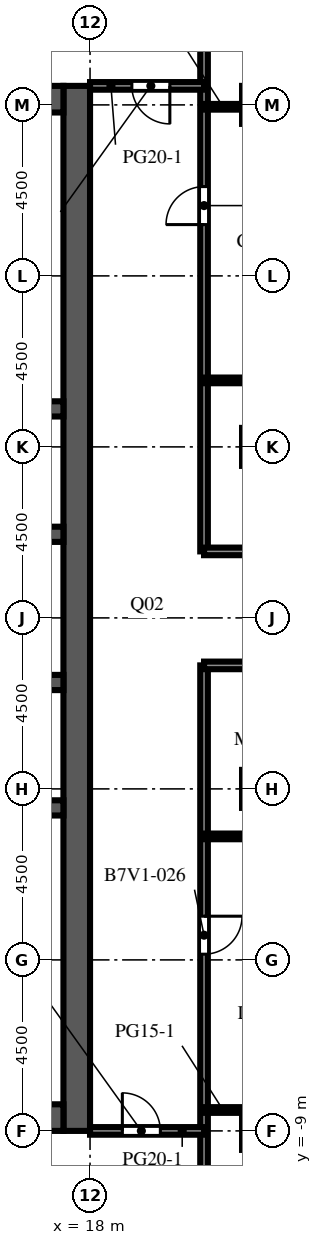
"""IFC4 building model, lengths in metres.
Left out: names, types, materials, properties, quantities, classifications, styles, units other than length and angle.
Written with IfcOpenShell. Run it as: python <this file> out.ifc"""

import sys

from ifc_helpers import new_model, si_unit, direction, frame, frame_2d, origin, place, context, subcontext, project, spatial, rectangle, extrude, element, fill, save


model = new_model("IFC4")
c1 = context("Model", 3, precision=1e-05, world=origin(), true_north=direction((0.0, 1.0)))
c2 = subcontext(c1, "Body", "Model", "MODEL_VIEW")
j1 = project(units=[si_unit("LENGTHUNIT", "METRE"), si_unit("PLANEANGLEUNIT", "RADIAN")], contexts=[c1])
p1 = place(None, origin())
s1 = spatial("IfcSite", under=j1, at=p1, CompositionType="ELEMENT")
p2 = place(p1, origin())
s2 = spatial("IfcBuilding", under=s1, at=p2, CompositionType="ELEMENT")
p3 = place(p2, frame((0.0, 0.0, 248.0)))
s3 = spatial("IfcBuildingStorey", under=s2, at=p3, CompositionType="ELEMENT", Elevation=248.0)
p4 = place(p3, frame((17.65, -9.0, 0.0), z_axis=(0.0, 0.0, 1.0), x_axis=(0.0, 1.0, 0.0)))
e1 = element("IfcWall", 1, at=p4, inside=s3, PredefinedType="SHEAR", context=c2, shape_type="SweptSolid", body=[
    extrude(rectangle(XDim=27.5, YDim=0.7, at=frame_2d((13.75, 0.0))), origin(), (0.0, 0.0, 1.0), 4.1),
])
p5 = place(p4, frame((12.55, 0.0, 0.0)))
e2 = element("IfcOpeningElement", 2, at=p5, cuts=e1, PredefinedType="OPENING", context=c2, shape_type="SweptSolid", body=[
    extrude(rectangle(XDim=2.4, YDim=2.4, at=frame_2d((1.2, 1.2))), frame((0.0, 0.36, 0.0), z_axis=(0.0, -1.0, 0.0), x_axis=(1.0, 0.0, 0.0)), (0.0, 0.0, 1.0), 0.72),
])
p6 = place(p4, frame((6.825, 0.0, 0.0)))
e3 = element("IfcOpeningElement", 3, at=p6, cuts=e1, PredefinedType="OPENING", context=c2, shape_type="SweptSolid", body=[
    extrude(rectangle(XDim=1.2, YDim=2.1, at=frame_2d((0.6, 1.05))), frame((0.0, 0.36, 0.0), z_axis=(0.0, -1.0, 0.0), x_axis=(1.0, 0.0, 0.0)), (0.0, 0.0, 1.0), 0.72),
])
p7 = place(p4, frame((19.475, 0.0, 0.0)))
e4 = element("IfcOpeningElement", 4, at=p7, cuts=e1, PredefinedType="OPENING", context=c2, shape_type="SweptSolid", body=[
    extrude(rectangle(XDim=1.2, YDim=2.1, at=frame_2d((0.6, 1.05))), frame((0.0, 0.36, 0.0), z_axis=(0.0, -1.0, 0.0), x_axis=(1.0, 0.0, 0.0)), (0.0, 0.0, 1.0), 0.72),
])
for number, where, z_axis, x_axis in (
    (5, (6.7, -8.65, 0.0), (0.0, 0.0, 1.0), (1.0, 0.0, 0.0)),
    (6, (6.7, 18.15, 0.0), (0.0, 0.0, 1.0), (1.0, 0.0, 0.0)),
):
    element("IfcWall", number, at=place(p3, frame(where, z_axis=z_axis, x_axis=x_axis)), inside=s3, PredefinedType="SHEAR", context=c2, shape_type="SweptSolid", body=[
        extrude(rectangle(XDim=10.6, YDim=0.7, at=frame_2d((5.3, 0.0))), origin(), (0.0, 0.0, 1.0), 4.1),
    ])
p8 = place(p3, frame((6.7, -0.5, 0.0), z_axis=(0.0, 0.0, 1.0), x_axis=(1.0, 0.0, 0.0)))
e7 = element("IfcWall", 7, at=p8, inside=s3, PredefinedType="SHEAR", context=c2, shape_type="SweptSolid", body=[
    extrude(rectangle(XDim=10.6, YDim=0.4, at=frame_2d((5.3, 0.0))), origin(), (0.0, 0.0, 1.0), 4.1),
])
p9 = place(p3, frame((6.7, 2.8, 0.0), z_axis=(0.0, 0.0, 1.0), x_axis=(1.0, 0.0, 0.0)))
e8 = element("IfcWall", 8, at=p9, inside=s3, PredefinedType="SHEAR", context=c2, shape_type="SweptSolid", body=[
    extrude(rectangle(XDim=10.6, YDim=0.4, at=frame_2d((5.3, 0.0))), origin(), (0.0, 0.0, 1.0), 4.1),
])
p10 = place(p9, frame((0.688, 0.0, 0.0)))
e9 = element("IfcOpeningElement", 9, at=p10, cuts=e8, PredefinedType="OPENING", context=c2, shape_type="SweptSolid", body=[
    extrude(rectangle(XDim=1.1, YDim=2.1, at=frame_2d((0.55, 1.05))), frame((0.0, 0.21, 0.0), z_axis=(0.0, -1.0, 0.0), x_axis=(1.0, 0.0, 0.0)), (0.0, 0.0, 1.0), 0.42),
])
p11 = place(p9, frame((3.438, 0.0, 0.0)))
e10 = element("IfcOpeningElement", 10, at=p11, cuts=e8, PredefinedType="OPENING", context=c2, shape_type="SweptSolid", body=[
    extrude(rectangle(XDim=1.1, YDim=2.1, at=frame_2d((0.55, 1.05))), frame((0.0, 0.21, 0.0), z_axis=(0.0, -1.0, 0.0), x_axis=(1.0, 0.0, 0.0)), (0.0, 0.0, 1.0), 0.42),
])
p12 = place(p9, frame((6.113, 0.0, 0.0)))
e11 = element("IfcOpeningElement", 11, at=p12, cuts=e8, PredefinedType="OPENING", context=c2, shape_type="SweptSolid", body=[
    extrude(rectangle(XDim=1.0, YDim=2.1, at=frame_2d((0.5, 1.05))), frame((0.0, 0.21, 0.0), z_axis=(0.0, -1.0, 0.0), x_axis=(1.0, 0.0, 0.0)), (0.0, 0.0, 1.0), 0.42),
])
p13 = place(p9, frame((8.863, 0.0, 0.0)))
e12 = element("IfcOpeningElement", 12, at=p13, cuts=e8, PredefinedType="OPENING", context=c2, shape_type="SweptSolid", body=[
    extrude(rectangle(XDim=1.0, YDim=2.1, at=frame_2d((0.5, 1.05))), frame((0.0, 0.21, 0.0), z_axis=(0.0, -1.0, 0.0), x_axis=(1.0, 0.0, 0.0)), (0.0, 0.0, 1.0), 0.42),
])
p14 = place(p3, frame((6.7, 6.7, 0.0), z_axis=(0.0, 0.0, 1.0), x_axis=(1.0, 0.0, 0.0)))
e13 = element("IfcWall", 13, at=p14, inside=s3, PredefinedType="SHEAR", context=c2, shape_type="SweptSolid", body=[
    extrude(rectangle(XDim=10.6, YDim=0.4, at=frame_2d((5.3, 0.0))), origin(), (0.0, 0.0, 1.0), 4.1),
])
p15 = place(p14, frame((3.438, 0.0, 0.0)))
e14 = element("IfcOpeningElement", 14, at=p15, cuts=e13, PredefinedType="OPENING", context=c2, shape_type="SweptSolid", body=[
    extrude(rectangle(XDim=1.1, YDim=2.1, at=frame_2d((0.55, 1.05))), frame((0.0, 0.21, 0.0), z_axis=(0.0, -1.0, 0.0), x_axis=(1.0, 0.0, 0.0)), (0.0, 0.0, 1.0), 0.42),
])
p16 = place(p14, frame((6.062, 0.0, 0.0)))
e15 = element("IfcOpeningElement", 15, at=p16, cuts=e13, PredefinedType="OPENING", context=c2, shape_type="SweptSolid", body=[
    extrude(rectangle(XDim=1.1, YDim=2.1, at=frame_2d((0.55, 1.05))), frame((0.0, 0.21, 0.0), z_axis=(0.0, -1.0, 0.0), x_axis=(1.0, 0.0, 0.0)), (0.0, 0.0, 1.0), 0.42),
])
p17 = place(p14, frame((8.812, 0.0, 0.0)))
e16 = element("IfcOpeningElement", 16, at=p17, cuts=e13, PredefinedType="OPENING", context=c2, shape_type="SweptSolid", body=[
    extrude(rectangle(XDim=1.1, YDim=2.1, at=frame_2d((0.55, 1.05))), frame((0.0, 0.21, 0.0), z_axis=(0.0, -1.0, 0.0), x_axis=(1.0, 0.0, 0.0)), (0.0, 0.0, 1.0), 0.42),
])
p18 = place(p14, frame((0.738, 0.0, 0.0)))
e17 = element("IfcOpeningElement", 17, at=p18, cuts=e13, PredefinedType="OPENING", context=c2, shape_type="SweptSolid", body=[
    extrude(rectangle(XDim=1.0, YDim=2.1, at=frame_2d((0.5, 1.05))), frame((0.0, 0.21, 0.0), z_axis=(0.0, -1.0, 0.0), x_axis=(1.0, 0.0, 0.0)), (0.0, 0.0, 1.0), 0.42),
])
p19 = place(p3, frame((6.7, 10.0, 0.0), z_axis=(0.0, 0.0, 1.0), x_axis=(1.0, 0.0, 0.0)))
e18 = element("IfcWall", 18, at=p19, inside=s3, PredefinedType="SHEAR", context=c2, shape_type="SweptSolid", body=[
    extrude(rectangle(XDim=10.6, YDim=0.4, at=frame_2d((5.3, 0.0))), origin(), (0.0, 0.0, 1.0), 4.1),
])
p20 = place(p3, frame((21.0, 3.25, 0.0), z_axis=(0.0, 0.0, 1.0), x_axis=(0.0, -1.0, 0.0)))
e19 = element("IfcWall", 19, at=p20, inside=s3, PredefinedType="PARTITIONING", context=c2, shape_type="SweptSolid", body=[
    extrude(rectangle(XDim=25.6, YDim=0.2, at=frame_2d((12.8, 0.0))), origin(), (0.0, 0.0, 1.0), 3.65),
])
p21 = place(p20, frame((6.6, 0.0, 0.0)))
e20 = element("IfcOpeningElement", 20, at=p21, cuts=e19, PredefinedType="OPENING", context=c2, shape_type="SweptSolid", body=[
    extrude(rectangle(XDim=1.0, YDim=2.1, at=frame_2d((0.5, 1.05))), frame((0.0, 0.11, 0.0), z_axis=(0.0, -1.0, 0.0), x_axis=(1.0, 0.0, 0.0)), (0.0, 0.0, 1.0), 0.22),
])
p22 = place(p3, frame((21.0, 31.35, 0.0), z_axis=(0.0, 0.0, 1.0), x_axis=(0.0, -1.0, 0.0)))
e21 = element("IfcWall", 21, at=p22, inside=s3, PredefinedType="PARTITIONING", context=c2, shape_type="SweptSolid", body=[
    extrude(rectangle(XDim=25.1, YDim=0.2, at=frame_2d((12.55, 0.0))), origin(), (0.0, 0.0, 1.0), 3.65),
])
p23 = place(p22, frame((15.5, 0.0, 0.0)))
e22 = element("IfcOpeningElement", 22, at=p23, cuts=e21, PredefinedType="OPENING", context=c2, shape_type="SweptSolid", body=[
    extrude(rectangle(XDim=1.0, YDim=2.1, at=frame_2d((0.5, 1.05))), frame((0.0, 0.11, 0.0), z_axis=(0.0, -1.0, 0.0), x_axis=(1.0, 0.0, 0.0)), (0.0, 0.0, 1.0), 0.22),
])
p24 = place(p3, frame((21.0, -9.0, 0.0), z_axis=(0.0, 0.0, 1.0), x_axis=(-1.0, 0.0, 0.0)))
e23 = element("IfcWall", 23, at=p24, inside=s3, PredefinedType="PARTITIONING", context=c2, shape_type="SweptSolid", body=[
    extrude(rectangle(XDim=3.0, YDim=0.2, at=frame_2d((1.5, 0.0))), origin(), (0.0, 0.0, 1.0), 3.65),
])
p25 = place(p24, frame((1.15, 0.0, 0.0)))
e24 = element("IfcOpeningElement", 24, at=p25, cuts=e23, PredefinedType="OPENING", context=c2, shape_type="SweptSolid", body=[
    extrude(rectangle(XDim=1.0, YDim=2.1, at=frame_2d((0.5, 1.05))), frame((0.0, 0.11, 0.0), z_axis=(0.0, -1.0, 0.0), x_axis=(1.0, 0.0, 0.0)), (0.0, 0.0, 1.0), 0.22),
])
p26 = place(p3, frame((21.0, -8.45, 0.0), z_axis=(0.0, 0.0, 1.0), x_axis=(1.0, 0.0, 0.0)))
e25 = element("IfcWall", 25, at=p26, inside=s3, PredefinedType="PARTITIONING", context=c2, shape_type="SweptSolid", body=[
    extrude(rectangle(XDim=1.0, YDim=0.15, at=frame_2d((0.5, 0.0))), origin(), (0.0, 0.0, 1.0), 3.65),
])
p27 = place(p3, frame((21.0, -1.25, 0.0), z_axis=(0.0, 0.0, 1.0), x_axis=(1.0, 0.0, 0.0)))
e26 = element("IfcWall", 26, at=p27, inside=s3, PredefinedType="PARTITIONING", context=c2, shape_type="SweptSolid", body=[
    extrude(rectangle(XDim=5.85, YDim=0.15, at=frame_2d((2.925, 0.0))), origin(), (0.0, 0.0, 1.0), 3.65),
])
p28 = place(p27, frame((3.1, 0.0, 0.0)))
e27 = element("IfcOpeningElement", 27, at=p28, cuts=e26, PredefinedType="OPENING", context=c2, shape_type="SweptSolid", body=[
    extrude(rectangle(XDim=1.0, YDim=2.1, at=frame_2d((0.5, 1.05))), frame((0.0, 0.085, 0.0), z_axis=(0.0, -1.0, 0.0), x_axis=(1.0, 0.0, 0.0)), (0.0, 0.0, 1.0), 0.17),
])
for number, where, z_axis, x_axis in (
    (28, (21.0, 3.25, 0.0), (0.0, 0.0, 1.0), (1.0, 0.0, 0.0)),
    (29, (21.0, 6.25, 0.0), (0.0, 0.0, 1.0), (1.0, 0.0, 0.0)),
):
    element("IfcWall", number, at=place(p3, frame(where, z_axis=z_axis, x_axis=x_axis)), inside=s3, PredefinedType="PARTITIONING", context=c2, shape_type="SweptSolid", body=[
        extrude(rectangle(XDim=5.85, YDim=0.2, at=frame_2d((2.925, 0.0))), origin(), (0.0, 0.0, 1.0), 3.65),
    ])
p29 = place(p3, frame((26.85, 10.75, 0.0), z_axis=(0.0, 0.0, 1.0), x_axis=(-1.0, 0.0, 0.0)))
e30 = element("IfcWall", 30, at=p29, inside=s3, PredefinedType="PARTITIONING", context=c2, shape_type="SweptSolid", body=[
    extrude(rectangle(XDim=5.85, YDim=0.15, at=frame_2d((2.925, 0.0))), origin(), (0.0, 0.0, 1.0), 3.65),
])
p30 = place(p29, frame((2.0, 0.0, 0.0)))
e31 = element("IfcOpeningElement", 31, at=p30, cuts=e30, PredefinedType="OPENING", context=c2, shape_type="SweptSolid", body=[
    extrude(rectangle(XDim=1.0, YDim=2.1, at=frame_2d((0.5, 1.05))), frame((0.0, 0.085, 0.0), z_axis=(0.0, -1.0, 0.0), x_axis=(1.0, 0.0, 0.0)), (0.0, 0.0, 1.0), 0.17),
])
p31 = place(p3, frame((21.0, 17.95, 0.0), z_axis=(0.0, 0.0, 1.0), x_axis=(1.0, 0.0, 0.0)))
e32 = element("IfcWall", 32, at=p31, inside=s3, PredefinedType="PARTITIONING", context=c2, shape_type="SweptSolid", body=[
    extrude(rectangle(XDim=1.0, YDim=0.15, at=frame_2d((0.5, 0.0))), origin(), (0.0, 0.0, 1.0), 3.65),
])
p32 = place(p3, frame((18.0, 18.5, 0.0), z_axis=(0.0, 0.0, 1.0), x_axis=(1.0, 0.0, 0.0)))
e33 = element("IfcWall", 33, at=p32, inside=s3, PredefinedType="PARTITIONING", context=c2, shape_type="SweptSolid", body=[
    extrude(rectangle(XDim=3.0, YDim=0.2, at=frame_2d((1.5, 0.0))), origin(), (0.0, 0.0, 1.0), 3.65),
])
p33 = place(p32, frame((1.1, 0.0, 0.0)))
e34 = element("IfcOpeningElement", 34, at=p33, cuts=e33, PredefinedType="OPENING", context=c2, shape_type="SweptSolid", body=[
    extrude(rectangle(XDim=1.0, YDim=2.1, at=frame_2d((0.5, 1.05))), frame((0.0, 0.11, 0.0), z_axis=(0.0, -1.0, 0.0), x_axis=(1.0, 0.0, 0.0)), (0.0, 0.0, 1.0), 0.22),
])
p34 = place(p5, origin())
e35 = element("IfcDoor", 35, at=p34, inside=s3, OperationType="DOUBLE_DOOR_DOUBLE_SWING", PredefinedType="DOOR", context=c2, shape_type="SweptSolid", body=[
    extrude(rectangle(XDim=2.4, YDim=2.4, at=frame_2d((1.2, 1.2))), frame((0.0, 0.025, 0.0), z_axis=(0.0, -1.0, 0.0), x_axis=(1.0, 0.0, 0.0)), (0.0, 0.0, 1.0), 0.05),
])
fill(e2, e35)
p35 = place(p6, frame((1.2, 0.0, 0.0), z_axis=(0.0, 0.0, 1.0), x_axis=(-1.0, 0.0, 0.0)))
e36 = element("IfcDoor", 36, at=p35, inside=s3, OperationType="SINGLE_SWING_LEFT", PredefinedType="DOOR", context=c2, shape_type="SweptSolid", body=[
    extrude(rectangle(XDim=1.2, YDim=2.1, at=frame_2d((0.6, 1.05))), frame((0.0, 0.025, 0.0), z_axis=(0.0, -1.0, 0.0), x_axis=(1.0, 0.0, 0.0)), (0.0, 0.0, 1.0), 0.05),
])
fill(e3, e36)
p36 = place(p7, frame((1.2, 0.0, 0.0), z_axis=(0.0, 0.0, 1.0), x_axis=(-1.0, 0.0, 0.0)))
e37 = element("IfcDoor", 37, at=p36, inside=s3, OperationType="SINGLE_SWING_LEFT", PredefinedType="DOOR", context=c2, shape_type="SweptSolid", body=[
    extrude(rectangle(XDim=1.2, YDim=2.1, at=frame_2d((0.6, 1.05))), frame((0.0, 0.025, 0.0), z_axis=(0.0, -1.0, 0.0), x_axis=(1.0, 0.0, 0.0)), (0.0, 0.0, 1.0), 0.05),
])
fill(e4, e37)
p37 = place(p25, origin())
e38 = element("IfcDoor", 38, at=p37, inside=s3, OperationType="SINGLE_SWING_RIGHT", PredefinedType="DOOR", context=c2, shape_type="SweptSolid", body=[
    extrude(rectangle(XDim=1.0, YDim=2.1, at=frame_2d((0.5, 1.05))), frame((0.0, 0.025, 0.0), z_axis=(0.0, -1.0, 0.0), x_axis=(1.0, 0.0, 0.0)), (0.0, 0.0, 1.0), 0.05),
])
fill(e24, e38)
p38 = place(p33, origin())
e39 = element("IfcDoor", 39, at=p38, inside=s3, OperationType="SINGLE_SWING_RIGHT", PredefinedType="DOOR", context=c2, shape_type="SweptSolid", body=[
    extrude(rectangle(XDim=1.0, YDim=2.1, at=frame_2d((0.5, 1.05))), frame((0.0, 0.025, 0.0), z_axis=(0.0, -1.0, 0.0), x_axis=(1.0, 0.0, 0.0)), (0.0, 0.0, 1.0), 0.05),
])
fill(e34, e39)
p39 = place(p21, origin())
e40 = element("IfcDoor", 40, at=p39, inside=s3, OperationType="SINGLE_SWING_LEFT", PredefinedType="DOOR", context=c2, shape_type="SweptSolid", body=[
    extrude(rectangle(XDim=1.0, YDim=2.1, at=frame_2d((0.5, 1.05))), frame((0.0, 0.025, 0.0), z_axis=(0.0, -1.0, 0.0), x_axis=(1.0, 0.0, 0.0)), (0.0, 0.0, 1.0), 0.05),
])
fill(e20, e40)
p40 = place(p23, origin())
e41 = element("IfcDoor", 41, at=p40, inside=s3, OperationType="SINGLE_SWING_RIGHT", PredefinedType="DOOR", context=c2, shape_type="SweptSolid", body=[
    extrude(rectangle(XDim=1.0, YDim=2.1, at=frame_2d((0.5, 1.05))), frame((0.0, 0.025, 0.0), z_axis=(0.0, -1.0, 0.0), x_axis=(1.0, 0.0, 0.0)), (0.0, 0.0, 1.0), 0.05),
])
fill(e22, e41)
save(model, sys.argv[1])
